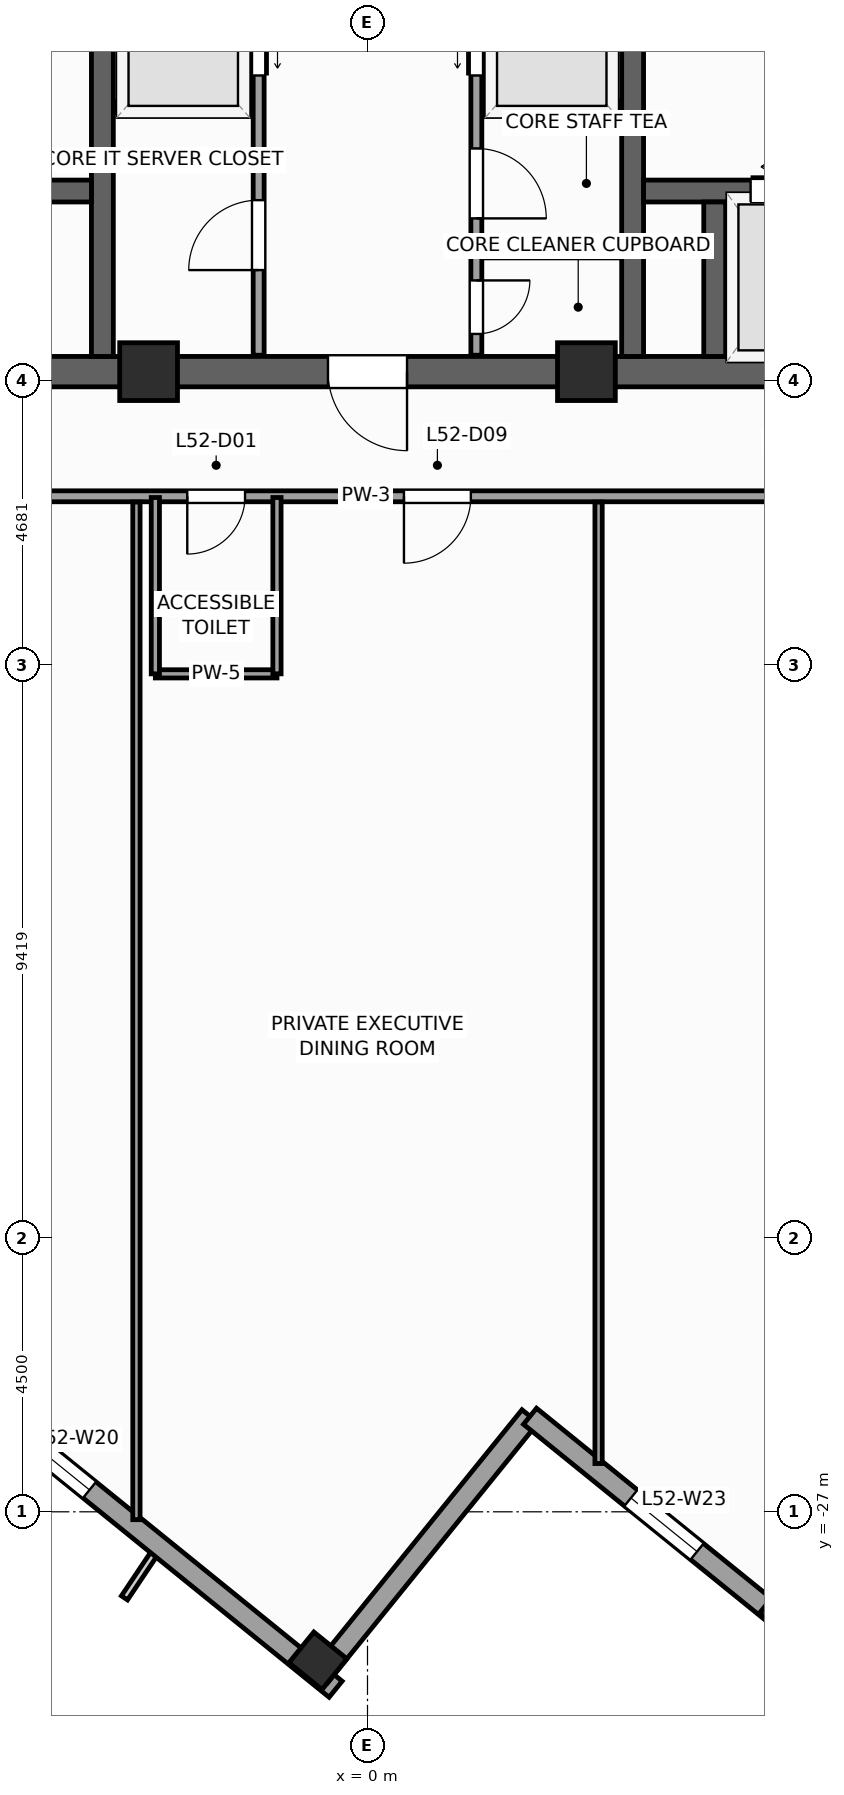
"""IFC4 building model, lengths in metres.
Left out: names, types, materials, properties, quantities, classifications, styles, units other than length and angle.
Written with IfcOpenShell. Run it as: python <this file> out.ifc"""

import sys

from ifc_helpers import new_model, si_unit, direction, frame, frame_2d, origin, origin_2d, place, context, subcontext, project, spatial, rectangle, extrude, source, transform, mapped, element, fill, save


model = new_model("IFC4")
c1 = context("Model", 3, precision=1e-05, world=origin(), true_north=direction((0.0, 1.0)))
c2 = subcontext(c1, "Body", "Model", "MODEL_VIEW")
j1 = project(units=[si_unit("LENGTHUNIT", "METRE"), si_unit("PLANEANGLEUNIT", "RADIAN")], contexts=[c1])
p1 = place(None, origin())
s1 = spatial("IfcSite", under=j1, at=p1, CompositionType="ELEMENT")
p2 = place(p1, origin())
s2 = spatial("IfcBuilding", under=s1, at=p2, CompositionType="ELEMENT")
p3 = place(p2, frame((0.0, 0.0, 217.3)))
s3 = spatial("IfcBuildingStorey", under=s2, at=p3, CompositionType="ELEMENT", Elevation=217.3)
p4 = place(p3, frame((-8.5, -8.25, 0.0), z_axis=(0.0, 0.0, 1.0), x_axis=(1.0, 0.0, 0.0)))
e1 = element("IfcWall", 1, at=p4, inside=s3, PredefinedType="SHEAR", context=c2, shape_type="SweptSolid", body=[
    extrude(rectangle(XDim=17.0, YDim=0.5, at=frame_2d((8.5, 0.0))), origin(), (0.0, 0.0, 1.0), 3.9),
])
p5 = place(p4, frame((7.85, 0.0, 0.0)))
e2 = element("IfcOpeningElement", 2, at=p5, cuts=e1, PredefinedType="OPENING", context=c2, shape_type="SweptSolid", body=[
    extrude(rectangle(XDim=1.3, YDim=2.2, at=frame_2d((0.65, 1.1))), frame((0.0, 0.26, 0.0), z_axis=(0.0, -1.0, 0.0), x_axis=(1.0, 0.0, 0.0)), (0.0, 0.0, 1.0), 0.52),
])
for number, where, z_axis, x_axis in (
    (3, (-4.36, -8.0, 0.0), (0.0, 0.0, 1.0), (0.0, 1.0, 0.0)),
    (4, (4.36, -8.0, 0.0), (0.0, 0.0, 1.0), (0.0, 1.0, 0.0)),
):
    element("IfcWall", number, at=place(p3, frame(where, z_axis=z_axis, x_axis=x_axis)), inside=s3, PredefinedType="SHEAR", context=c2, shape_type="SweptSolid", body=[
        extrude(rectangle(XDim=16.0, YDim=0.36, at=frame_2d((8.0, 0.0))), origin(), (0.0, 0.0, 1.0), 3.9),
    ])
p6 = place(p3, frame((-8.0, -5.28, 0.0), z_axis=(0.0, 0.0, 1.0), x_axis=(1.0, 0.0, 0.0)))
e5 = element("IfcWall", 5, at=p6, inside=s3, PredefinedType="SHEAR", context=c2, shape_type="SweptSolid", body=[
    extrude(rectangle(XDim=3.46, YDim=0.36, at=frame_2d((1.73, 0.0))), origin(), (0.0, 0.0, 1.0), 3.9),
])
p7 = place(p6, frame((0.5, 0.0, 0.0)))
e6 = element("IfcOpeningElement", 6, at=p7, cuts=e5, PredefinedType="OPENING", context=c2, shape_type="SweptSolid", body=[
    extrude(rectangle(XDim=1.2, YDim=2.25, at=frame_2d((0.6, 1.125))), frame((0.0, 0.19, 0.0), z_axis=(0.0, -1.0, 0.0), x_axis=(1.0, 0.0, 0.0)), (0.0, 0.0, 1.0), 0.38),
])
p8 = place(p3, frame((4.54, -5.28, 0.0), z_axis=(0.0, 0.0, 1.0), x_axis=(1.0, 0.0, 0.0)))
e7 = element("IfcWall", 7, at=p8, inside=s3, PredefinedType="SHEAR", context=c2, shape_type="SweptSolid", body=[
    extrude(rectangle(XDim=3.46, YDim=0.36, at=frame_2d((1.73, 0.0))), origin(), (0.0, 0.0, 1.0), 3.9),
])
p9 = place(p8, frame((1.76, 0.0, 0.0)))
e8 = element("IfcOpeningElement", 8, at=p9, cuts=e7, PredefinedType="OPENING", context=c2, shape_type="SweptSolid", body=[
    extrude(rectangle(XDim=1.2, YDim=2.25, at=frame_2d((0.6, 1.125))), frame((0.0, 0.19, 0.0), z_axis=(0.0, -1.0, 0.0), x_axis=(1.0, 0.0, 0.0)), (0.0, 0.0, 1.0), 0.38),
])
p10 = place(p3, frame((5.71, -8.0, 0.0), z_axis=(0.0, 0.0, 1.0), x_axis=(0.0, 1.0, 0.0)))
e9 = element("IfcWall", 9, at=p10, inside=s3, PredefinedType="SHEAR", context=c2, shape_type="SweptSolid", body=[
    extrude(rectangle(XDim=2.54, YDim=0.36, at=frame_2d((1.27, 0.0))), origin(), (0.0, 0.0, 1.0), 3.9),
])
m1 = source(origin(), c2, "Body", "SweptSolid", [
    extrude(rectangle(XDim=0.95, YDim=0.95, at=origin_2d()), origin(), (0.0, 0.0, 1.0), 3.9),
])
for number, where, z_axis, x_axis in (
    (10, (-3.6, -8.25, 0.0), (0.0, 0.0, 1.0), (1.0, 0.0, 0.0)),
    (11, (3.6, -8.25, 0.0), (0.0, 0.0, 1.0), (1.0, 0.0, 0.0)),
):
    element("IfcColumn", number, at=place(p3, frame(where, z_axis=z_axis, x_axis=x_axis)), inside=s3, PredefinedType="PILASTER", context=c2, shape_type="MappedRepresentation", body=[
        mapped(m1, transform((0.0, 0.0, 0.0), scale=1.0)),
    ])
m2 = source(origin(), c2, "Body", "SweptSolid", [
    extrude(rectangle(XDim=0.65, YDim=0.7, at=origin_2d()), origin(), (0.0, 0.0, 1.0), 3.9),
])
for number, where, z_axis, x_axis in (
    (12, (6.92, -28.637, 0.0), (0.0, 0.0, 1.0), (0.629, 0.777, 0.0)),
    (13, (-0.815, -29.45, 0.0), (0.0, 0.0, 1.0), (0.629, 0.777, 0.0)),
):
    element("IfcColumn", number, at=place(p3, frame(where, z_axis=z_axis, x_axis=x_axis)), inside=s3, PredefinedType="COLUMN", context=c2, shape_type="MappedRepresentation", body=[
        mapped(m2, transform((0.0, 0.0, 0.0), scale=1.0)),
    ])
p11 = place(p3, frame((-29.154, -6.733, 0.0), z_axis=(0.0, 0.0, 1.0), x_axis=(0.77714192302, -0.629325378072, 0.0)))
e14 = element("IfcWall", 14, at=p11, inside=s3, PredefinedType="STANDARD", context=c2, shape_type="SweptSolid", body=[
    extrude(rectangle(XDim=36.84, YDim=0.34, at=frame_2d((18.42, 0.0))), origin(), (0.0, 0.0, 1.0), 2.96),
])
p12 = place(p11, frame((23.495, 0.0, 0.0)))
e15 = element("IfcOpeningElement", 15, at=p12, cuts=e14, PredefinedType="OPENING", context=c2, shape_type="SweptSolid", body=[
    extrude(rectangle(XDim=1.05, YDim=2.25, at=frame_2d((0.525, 1.125))), frame((0.0, 0.18, 0.0), z_axis=(0.0, -1.0, 0.0), x_axis=(1.0, 0.0, 0.0)), (0.0, 0.0, 1.0), 0.36),
])
p13 = place(p11, frame((3.721, 0.0, 0.48)))
e16 = element("IfcOpeningElement", 16, at=p13, cuts=e14, PredefinedType="OPENING", context=c2, shape_type="SweptSolid", body=[
    extrude(rectangle(XDim=1.4, YDim=2.4, at=frame_2d((0.7, 1.2))), frame((0.0, 0.18, 0.0), z_axis=(0.0, -1.0, 0.0), x_axis=(1.0, 0.0, 0.0)), (0.0, 0.0, 1.0), 0.36),
])
p14 = place(p11, frame((9.809, 0.0, 0.58)))
e17 = element("IfcOpeningElement", 17, at=p14, cuts=e14, PredefinedType="OPENING", context=c2, shape_type="SweptSolid", body=[
    extrude(rectangle(XDim=1.75, YDim=2.3, at=frame_2d((0.875, 1.15))), frame((0.0, 0.18, 0.0), z_axis=(0.0, -1.0, 0.0), x_axis=(1.0, 0.0, 0.0)), (0.0, 0.0, 1.0), 0.36),
])
p15 = place(p11, frame((16.058, 0.0, 0.58)))
e18 = element("IfcOpeningElement", 18, at=p15, cuts=e14, PredefinedType="OPENING", context=c2, shape_type="SweptSolid", body=[
    extrude(rectangle(XDim=1.75, YDim=2.3, at=frame_2d((0.875, 1.15))), frame((0.0, 0.18, 0.0), z_axis=(0.0, -1.0, 0.0), x_axis=(1.0, 0.0, 0.0)), (0.0, 0.0, 1.0), 0.36),
])
p16 = place(p11, frame((25.676, 0.0, 0.58)))
e19 = element("IfcOpeningElement", 19, at=p16, cuts=e14, PredefinedType="OPENING", context=c2, shape_type="SweptSolid", body=[
    extrude(rectangle(XDim=1.75, YDim=2.3, at=frame_2d((0.875, 1.15))), frame((0.0, 0.18, 0.0), z_axis=(0.0, -1.0, 0.0), x_axis=(1.0, 0.0, 0.0)), (0.0, 0.0, 1.0), 0.36),
])
p17 = place(p11, frame((30.232, 0.0, 0.48)))
e20 = element("IfcOpeningElement", 20, at=p17, cuts=e14, PredefinedType="OPENING", context=c2, shape_type="SweptSolid", body=[
    extrude(rectangle(XDim=1.4, YDim=2.4, at=frame_2d((0.7, 1.2))), frame((0.0, 0.18, 0.0), z_axis=(0.0, -1.0, 0.0), x_axis=(1.0, 0.0, 0.0)), (0.0, 0.0, 1.0), 0.36),
])
p18 = place(p3, frame((-0.789, -29.703, 0.0), z_axis=(0.0, 0.0, 1.0), x_axis=(0.629323365087, 0.77714355312, 0.0)))
e21 = element("IfcWall", 21, at=p18, inside=s3, PredefinedType="STANDARD", context=c2, shape_type="SweptSolid", body=[
    extrude(rectangle(XDim=5.5, YDim=0.34, at=frame_2d((2.75, 0.0))), origin(), (0.0, 0.0, 1.0), 3.66),
])
p19 = place(p3, frame((2.673, -25.429, 0.0), z_axis=(0.0, 0.0, 1.0), x_axis=(0.777162640055, -0.629299794138, 0.0)))
e22 = element("IfcWall", 22, at=p19, inside=s3, PredefinedType="STANDARD", context=c2, shape_type="SweptSolid", body=[
    extrude(rectangle(XDim=5.67, YDim=0.34, at=frame_2d((2.835, 0.0))), origin(), (0.0, 0.0, 1.0), 3.66),
])
p20 = place(p19, frame((2.135, 0.0, 0.48)))
e23 = element("IfcOpeningElement", 23, at=p20, cuts=e22, PredefinedType="OPENING", context=c2, shape_type="SweptSolid", body=[
    extrude(rectangle(XDim=1.4, YDim=2.4, at=frame_2d((0.7, 1.2))), frame((0.0, 0.18, 0.0), z_axis=(0.0, -1.0, 0.0), x_axis=(1.0, 0.0, 0.0)), (0.0, 0.0, 1.0), 0.36),
])
p21 = place(p3, frame((-1.79, -7.98, 0.0), z_axis=(0.0, 0.0, 1.0), x_axis=(0.0, 1.0, 0.0)))
e24 = element("IfcWall", 24, at=p21, inside=s3, PredefinedType="PARTITIONING", context=c2, shape_type="SweptSolid", body=[
    extrude(rectangle(XDim=12.38, YDim=0.18, at=frame_2d((6.19, 0.0))), origin(), (0.0, 0.0, 1.0), 3.66),
])
p22 = place(p21, frame((4.6, 0.0, 0.0)))
e25 = element("IfcOpeningElement", 25, at=p22, cuts=e24, PredefinedType="OPENING", context=c2, shape_type="SweptSolid", body=[
    extrude(rectangle(XDim=1.1, YDim=2.2, at=frame_2d((0.55, 1.1))), frame((0.0, 0.1, 0.0), z_axis=(0.0, -1.0, 0.0), x_axis=(1.0, 0.0, 0.0)), (0.0, 0.0, 1.0), 0.2),
])
p23 = place(p21, frame((6.66, 0.0, 0.0)))
e26 = element("IfcOpeningElement", 26, at=p23, cuts=e24, PredefinedType="OPENING", context=c2, shape_type="SweptSolid", body=[
    extrude(rectangle(XDim=1.1, YDim=2.2, at=frame_2d((0.55, 1.1))), frame((0.0, 0.1, 0.0), z_axis=(0.0, -1.0, 0.0), x_axis=(1.0, 0.0, 0.0)), (0.0, 0.0, 1.0), 0.2),
])
p24 = place(p21, frame((1.4, 0.0, 0.0)))
e27 = element("IfcOpeningElement", 27, at=p24, cuts=e24, PredefinedType="OPENING", context=c2, shape_type="SweptSolid", body=[
    extrude(rectangle(XDim=1.15, YDim=2.25, at=frame_2d((0.575, 1.125))), frame((0.0, 0.1, 0.0), z_axis=(0.0, -1.0, 0.0), x_axis=(1.0, 0.0, 0.0)), (0.0, 0.0, 1.0), 0.2),
])
p25 = place(p3, frame((1.79, -7.98, 0.0), z_axis=(0.0, 0.0, 1.0), x_axis=(0.0, 1.0, 0.0)))
e28 = element("IfcWall", 28, at=p25, inside=s3, PredefinedType="PARTITIONING", context=c2, shape_type="SweptSolid", body=[
    extrude(rectangle(XDim=12.38, YDim=0.18, at=frame_2d((6.19, 0.0))), origin(), (0.0, 0.0, 1.0), 3.66),
])
p26 = place(p25, frame((4.6, 0.0, 0.0)))
e29 = element("IfcOpeningElement", 29, at=p26, cuts=e28, PredefinedType="OPENING", context=c2, shape_type="SweptSolid", body=[
    extrude(rectangle(XDim=1.1, YDim=2.2, at=frame_2d((0.55, 1.1))), frame((0.0, 0.1, 0.0), z_axis=(0.0, -1.0, 0.0), x_axis=(1.0, 0.0, 0.0)), (0.0, 0.0, 1.0), 0.2),
])
p27 = place(p25, frame((6.66, 0.0, 0.0)))
e30 = element("IfcOpeningElement", 30, at=p27, cuts=e28, PredefinedType="OPENING", context=c2, shape_type="SweptSolid", body=[
    extrude(rectangle(XDim=1.1, YDim=2.2, at=frame_2d((0.55, 1.1))), frame((0.0, 0.1, 0.0), z_axis=(0.0, -1.0, 0.0), x_axis=(1.0, 0.0, 0.0)), (0.0, 0.0, 1.0), 0.2),
])
p28 = place(p25, frame((0.35, 0.0, 0.0)))
e31 = element("IfcOpeningElement", 31, at=p28, cuts=e28, PredefinedType="OPENING", context=c2, shape_type="SweptSolid", body=[
    extrude(rectangle(XDim=0.88, YDim=2.1, at=frame_2d((0.44, 1.05))), frame((0.0, 0.1, 0.0), z_axis=(0.0, -1.0, 0.0), x_axis=(1.0, 0.0, 0.0)), (0.0, 0.0, 1.0), 0.2),
])
p29 = place(p25, frame((2.25, 0.0, 0.0)))
e32 = element("IfcOpeningElement", 32, at=p29, cuts=e28, PredefinedType="OPENING", context=c2, shape_type="SweptSolid", body=[
    extrude(rectangle(XDim=1.15, YDim=2.25, at=frame_2d((0.575, 1.125))), frame((0.0, 0.1, 0.0), z_axis=(0.0, -1.0, 0.0), x_axis=(1.0, 0.0, 0.0)), (0.0, 0.0, 1.0), 0.2),
])
for number, where, z_axis, x_axis in (
    (33, (-4.17, -3.9, 0.0), (0.0, 0.0, 1.0), (1.0, 0.0, 0.0)),
    (34, (1.89, -3.9, 0.0), (0.0, 0.0, 1.0), (1.0, 0.0, 0.0)),
):
    element("IfcWall", number, at=place(p3, frame(where, z_axis=z_axis, x_axis=x_axis)), inside=s3, PredefinedType="PARTITIONING", context=c2, shape_type="SweptSolid", body=[
        extrude(rectangle(XDim=2.28, YDim=0.18, at=frame_2d((1.14, 0.0))), origin(), (0.0, 0.0, 1.0), 3.66),
    ])
p30 = place(p3, frame((1.89, -6.3, 0.0), z_axis=(0.0, 0.0, 1.0), x_axis=(1.0, 0.0, 0.0)))
e35 = element("IfcWall", 35, at=p30, inside=s3, PredefinedType="PARTITIONING", context=c2, shape_type="SweptSolid", body=[
    extrude(rectangle(XDim=2.28, YDim=0.16, at=frame_2d((1.14, 0.0))), origin(), (0.0, 0.0, 1.0), 3.66),
])
p31 = place(p3, frame((-11.4, -10.3, 0.0), z_axis=(0.0, 0.0, 1.0), x_axis=(1.0, 0.0, 0.0)))
e36 = element("IfcWall", 36, at=p31, inside=s3, PredefinedType="PARTITIONING", context=c2, shape_type="SweptSolid", body=[
    extrude(rectangle(XDim=22.75, YDim=0.18, at=frame_2d((11.375, 0.0))), origin(), (0.0, 0.0, 1.0), 3.66),
])
p32 = place(p31, frame((8.436, 0.0, 0.0)))
e37 = element("IfcOpeningElement", 37, at=p32, cuts=e36, PredefinedType="OPENING", context=c2, shape_type="SweptSolid", body=[
    extrude(rectangle(XDim=0.95, YDim=2.1, at=frame_2d((0.475, 1.05))), frame((0.0, 0.1, 0.0), z_axis=(0.0, -1.0, 0.0), x_axis=(1.0, 0.0, 0.0)), (0.0, 0.0, 1.0), 0.2),
])
p33 = place(p31, frame((1.58, 0.0, 0.0)))
e38 = element("IfcOpeningElement", 38, at=p33, cuts=e36, PredefinedType="OPENING", context=c2, shape_type="SweptSolid", body=[
    extrude(rectangle(XDim=0.95, YDim=2.1, at=frame_2d((0.475, 1.05))), frame((0.0, 0.1, 0.0), z_axis=(0.0, -1.0, 0.0), x_axis=(1.0, 0.0, 0.0)), (0.0, 0.0, 1.0), 0.2),
])
p34 = place(p31, frame((4.834, 0.0, 0.0)))
e39 = element("IfcOpeningElement", 39, at=p34, cuts=e36, PredefinedType="OPENING", context=c2, shape_type="SweptSolid", body=[
    extrude(rectangle(XDim=1.1, YDim=2.2, at=frame_2d((0.55, 1.1))), frame((0.0, 0.1, 0.0), z_axis=(0.0, -1.0, 0.0), x_axis=(1.0, 0.0, 0.0)), (0.0, 0.0, 1.0), 0.2),
])
p35 = place(p31, frame((12.0, 0.0, 0.0)))
e40 = element("IfcOpeningElement", 40, at=p35, cuts=e36, PredefinedType="OPENING", context=c2, shape_type="SweptSolid", body=[
    extrude(rectangle(XDim=1.1, YDim=2.2, at=frame_2d((0.55, 1.1))), frame((0.0, 0.1, 0.0), z_axis=(0.0, -1.0, 0.0), x_axis=(1.0, 0.0, 0.0)), (0.0, 0.0, 1.0), 0.2),
])
p36 = place(p31, frame((18.041, 0.0, 0.0)))
e41 = element("IfcOpeningElement", 41, at=p36, cuts=e36, PredefinedType="OPENING", context=c2, shape_type="SweptSolid", body=[
    extrude(rectangle(XDim=1.1, YDim=2.2, at=frame_2d((0.55, 1.1))), frame((0.0, 0.1, 0.0), z_axis=(0.0, -1.0, 0.0), x_axis=(1.0, 0.0, 0.0)), (0.0, 0.0, 1.0), 0.2),
])
p37 = place(p3, frame((-3.8, -27.129, 0.0), z_axis=(0.0, 0.0, 1.0), x_axis=(0.0, 1.0, 0.0)))
e42 = element("IfcWall", 42, at=p37, inside=s3, PredefinedType="PARTITIONING", context=c2, shape_type="SweptSolid", body=[
    extrude(rectangle(XDim=16.734, YDim=0.12, at=frame_2d((8.367, 0.0))), origin(), (0.0, 0.0, 1.0), 3.66),
])
p38 = place(p3, frame((3.8, -26.207, 0.0), z_axis=(0.0, 0.0, 1.0), x_axis=(0.0, 1.0, 0.0)))
e43 = element("IfcWall", 43, at=p38, inside=s3, PredefinedType="PARTITIONING", context=c2, shape_type="SweptSolid", body=[
    extrude(rectangle(XDim=15.812, YDim=0.12, at=frame_2d((7.906, 0.0))), origin(), (0.0, 0.0, 1.0), 3.66),
])
p39 = place(p3, frame((-3.489, -13.22, 0.0), z_axis=(0.0, 0.0, 1.0), x_axis=(1.0, 0.0, 0.0)))
e44 = element("IfcWall", 44, at=p39, inside=s3, PredefinedType="PARTITIONING", context=c2, shape_type="SweptSolid", body=[
    extrude(rectangle(XDim=2.0, YDim=0.135, at=frame_2d((1.0, 0.0))), origin(), (0.0, 0.0, 1.0), 2.76),
])
for number, where, z_axis, x_axis in (
    (45, (-1.489, -13.22, 0.0), (0.0, 0.0, 1.0), (0.0, 1.0, 0.0)),
    (46, (-3.489, -13.22, 0.0), (0.0, 0.0, 1.0), (0.0, 1.0, 0.0)),
):
    element("IfcWall", number, at=place(p3, frame(where, z_axis=z_axis, x_axis=x_axis)), inside=s3, PredefinedType="PARTITIONING", context=c2, shape_type="SweptSolid", body=[
        extrude(rectangle(XDim=2.9, YDim=0.135, at=frame_2d((1.45, 0.0))), origin(), (0.0, 0.0, 1.0), 3.66),
    ])
m3 = source(origin(), c2, "Body", "SweptSolid", [
    extrude(rectangle(XDim=1.4, YDim=2.4, at=frame_2d((0.7, 1.2))), frame((0.0, 0.03, 0.0), z_axis=(0.0, -1.0, 0.0), x_axis=(1.0, 0.0, 0.0)), (0.0, 0.0, 1.0), 0.06),
])
p40 = place(p17, origin())
e47 = element("IfcWindow", 47, at=p40, inside=s3, PartitioningType="SINGLE_PANEL", PredefinedType="WINDOW", context=c2, shape_type="MappedRepresentation", body=[
    mapped(m3, transform((0.0, 0.0, 0.0), scale=1.0)),
])
fill(e20, e47)
p41 = place(p20, origin())
e48 = element("IfcWindow", 48, at=p41, inside=s3, PartitioningType="SINGLE_PANEL", PredefinedType="WINDOW", context=c2, shape_type="MappedRepresentation", body=[
    mapped(m3, transform((0.0, 0.0, 0.0), scale=1.0)),
])
fill(e23, e48)
m4 = source(origin(), c2, "Body", "SweptSolid", [
    extrude(rectangle(XDim=1.3, YDim=2.2, at=frame_2d((0.65, 1.1))), frame((0.0, 0.025, 0.0), z_axis=(0.0, -1.0, 0.0), x_axis=(1.0, 0.0, 0.0)), (0.0, 0.0, 1.0), 0.05),
])
p42 = place(p5, frame((1.3, 0.0, 0.0), z_axis=(0.0, 0.0, 1.0), x_axis=(-1.0, 0.0, 0.0)))
e49 = element("IfcDoor", 49, at=p42, inside=s3, OperationType="SINGLE_SWING_RIGHT", PredefinedType="DOOR", context=c2, shape_type="MappedRepresentation", body=[
    mapped(m4, transform((0.0, 0.0, 0.0), scale=1.0)),
])
fill(e2, e49)
m5 = source(origin(), c2, "Body", "SweptSolid", [
    extrude(rectangle(XDim=1.2, YDim=2.25, at=frame_2d((0.6, 1.125))), frame((0.0, 0.025, 0.0), z_axis=(0.0, -1.0, 0.0), x_axis=(1.0, 0.0, 0.0)), (0.0, 0.0, 1.0), 0.05),
])
p43 = place(p9, origin())
e50 = element("IfcDoor", 50, at=p43, inside=s3, OperationType="DOUBLE_DOOR_SLIDING", PredefinedType="DOOR", context=c2, shape_type="MappedRepresentation", body=[
    mapped(m5, transform((0.0, 0.0, 0.0), scale=1.0)),
])
fill(e8, e50)
m6 = source(origin(), c2, "Body", "SweptSolid", [
    extrude(rectangle(XDim=1.1, YDim=2.2, at=frame_2d((0.55, 1.1))), frame((0.0, 0.025, 0.0), z_axis=(0.0, -1.0, 0.0), x_axis=(1.0, 0.0, 0.0)), (0.0, 0.0, 1.0), 0.05),
])
p44 = place(p22, frame((1.1, 0.0, 0.0), z_axis=(0.0, 0.0, 1.0), x_axis=(-1.0, 0.0, 0.0)))
e51 = element("IfcDoor", 51, at=p44, inside=s3, OperationType="DOUBLE_DOOR_SLIDING", PredefinedType="DOOR", context=c2, shape_type="MappedRepresentation", body=[
    mapped(m6, transform((0.0, 0.0, 0.0), scale=1.0)),
])
fill(e25, e51)
p45 = place(p26, origin())
e52 = element("IfcDoor", 52, at=p45, inside=s3, OperationType="DOUBLE_DOOR_SLIDING", PredefinedType="DOOR", context=c2, shape_type="MappedRepresentation", body=[
    mapped(m6, transform((0.0, 0.0, 0.0), scale=1.0)),
])
fill(e29, e52)
m7 = source(origin(), c2, "Body", "SweptSolid", [
    extrude(rectangle(XDim=1.15, YDim=2.25, at=frame_2d((0.575, 1.125))), frame((0.0, 0.025, 0.0), z_axis=(0.0, -1.0, 0.0), x_axis=(1.0, 0.0, 0.0)), (0.0, 0.0, 1.0), 0.05),
])
p46 = place(p24, origin())
e53 = element("IfcDoor", 53, at=p46, inside=s3, OperationType="SINGLE_SWING_LEFT", PredefinedType="DOOR", context=c2, shape_type="MappedRepresentation", body=[
    mapped(m7, transform((0.0, 0.0, 0.0), scale=1.0)),
])
fill(e27, e53)
m8 = source(origin(), c2, "Body", "SweptSolid", [
    extrude(rectangle(XDim=0.88, YDim=2.1, at=frame_2d((0.44, 1.05))), frame((0.0, 0.025, 0.0), z_axis=(0.0, -1.0, 0.0), x_axis=(1.0, 0.0, 0.0)), (0.0, 0.0, 1.0), 0.05),
])
p47 = place(p28, frame((0.88, 0.0, 0.0), z_axis=(0.0, 0.0, 1.0), x_axis=(-1.0, 0.0, 0.0)))
e54 = element("IfcDoor", 54, at=p47, inside=s3, OperationType="SINGLE_SWING_RIGHT", PredefinedType="DOOR", context=c2, shape_type="MappedRepresentation", body=[
    mapped(m8, transform((0.0, 0.0, 0.0), scale=1.0)),
])
fill(e31, e54)
p48 = place(p29, frame((1.15, 0.0, 0.0), z_axis=(0.0, 0.0, 1.0), x_axis=(-1.0, 0.0, 0.0)))
e55 = element("IfcDoor", 55, at=p48, inside=s3, OperationType="SINGLE_SWING_LEFT", PredefinedType="DOOR", context=c2, shape_type="MappedRepresentation", body=[
    mapped(m7, transform((0.0, 0.0, 0.0), scale=1.0)),
])
fill(e32, e55)
m9 = source(origin(), c2, "Body", "SweptSolid", [
    extrude(rectangle(XDim=0.95, YDim=2.1, at=frame_2d((0.475, 1.05))), frame((0.0, 0.025, 0.0), z_axis=(0.0, -1.0, 0.0), x_axis=(1.0, 0.0, 0.0)), (0.0, 0.0, 1.0), 0.05),
])
p49 = place(p32, frame((0.95, 0.0, 0.0), z_axis=(0.0, 0.0, 1.0), x_axis=(-1.0, 0.0, 0.0)))
e56 = element("IfcDoor", 56, at=p49, inside=s3, OperationType="SINGLE_SWING_LEFT", PredefinedType="DOOR", context=c2, shape_type="MappedRepresentation", body=[
    mapped(m9, transform((0.0, 0.0, 0.0), scale=1.0)),
])
fill(e37, e56)
p50 = place(p35, frame((1.1, 0.0, 0.0), z_axis=(0.0, 0.0, 1.0), x_axis=(-1.0, 0.0, 0.0)))
e57 = element("IfcDoor", 57, at=p50, inside=s3, OperationType="SINGLE_SWING_LEFT", PredefinedType="DOOR", context=c2, shape_type="MappedRepresentation", body=[
    mapped(m6, transform((0.0, 0.0, 0.0), scale=1.0)),
])
fill(e40, e57)
save(model, sys.argv[1])
